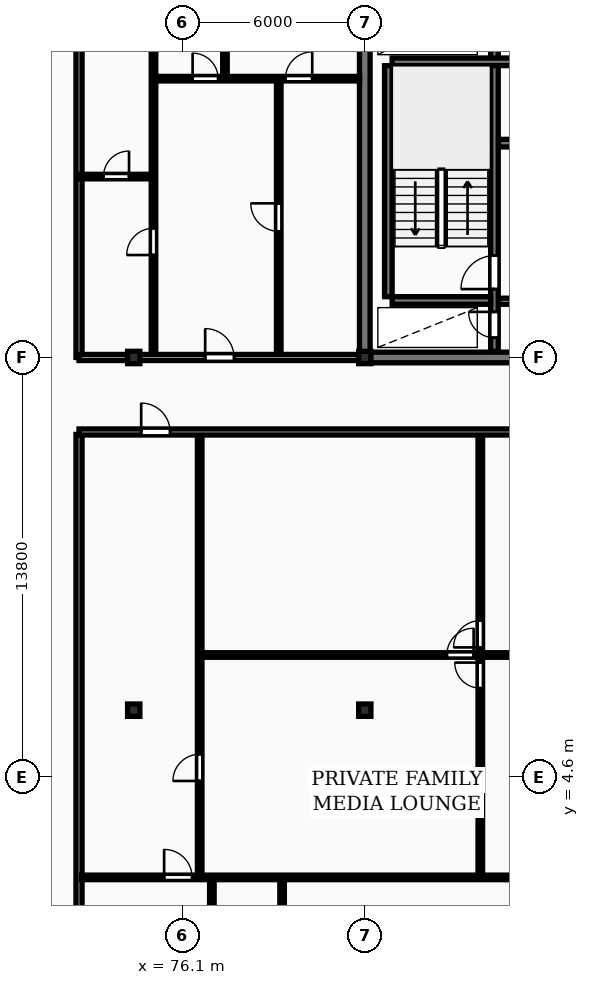
"""IFC4 building model, lengths in metres.
Left out: names, types, materials, properties, quantities, classifications, styles, units other than length and angle.
Written with IfcOpenShell. Run it as: python <this file> out.ifc"""

import sys

from ifc_helpers import new_model, si_unit, direction, frame, frame_2d, origin, origin_2d, place, context, subcontext, project, spatial, rectangle, i_section, extrude, element, fill, save


model = new_model("IFC4")
c1 = context("Model", 3, precision=1e-05, world=origin(), true_north=direction((0.0, 1.0)))
c2 = subcontext(c1, "Body", "Model", "MODEL_VIEW")
j1 = project(units=[si_unit("LENGTHUNIT", "METRE"), si_unit("PLANEANGLEUNIT", "RADIAN")], contexts=[c1])
p1 = place(None, origin())
s1 = spatial("IfcSite", under=j1, at=p1, CompositionType="ELEMENT")
p2 = place(p1, origin())
s2 = spatial("IfcBuilding", under=s1, at=p2, CompositionType="ELEMENT")
p3 = place(p2, frame((0.0, 0.0, 139.3)))
s3 = spatial("IfcBuildingStorey", under=s2, at=p3, CompositionType="ELEMENT", Elevation=139.3)
for number, where, z_axis, x_axis in (
    (1, (74.5, 6.8, 0.0), (0.0, 0.0, 1.0), (1.0, 0.0, 0.0)),
    (2, (74.5, 18.4, 0.0), (0.0, 0.0, 1.0), (1.0, 0.0, 0.0)),
    (3, (82.1, 6.8, 0.0), (0.0, 0.0, 1.0), (1.0, 0.0, 0.0)),
    (4, (82.1, 18.4, 0.0), (0.0, 0.0, 1.0), (1.0, 0.0, 0.0)),
):
    element("IfcColumn", number, at=place(p3, frame(where, z_axis=z_axis, x_axis=x_axis)), inside=s3, PredefinedType="COLUMN", context=c2, shape_type="SweptSolid", body=[
        extrude(i_section(OverallWidth=0.403, OverallDepth=0.406, WebThickness=0.027, FlangeThickness=0.043, FilletRadius=0.015, at=origin_2d()), origin(), (0.0, 0.0, 1.0), 3.6),
    ])
p4 = place(p3, frame((82.1, 18.575, 0.0), z_axis=(0.0, 0.0, 1.0), x_axis=(0.0, 1.0, 0.0)))
e5 = element("IfcWall", 5, at=p4, inside=s3, PredefinedType="SHEAR", context=c2, shape_type="SweptSolid", body=[
    extrude(rectangle(XDim=11.65, YDim=0.35, at=frame_2d((5.825, 0.0))), origin(), (0.0, 0.0, 1.0), 3.6),
])
p5 = place(p3, frame((81.925, 18.4, 0.0), z_axis=(0.0, 0.0, 1.0), x_axis=(1.0, 0.0, 0.0)))
e6 = element("IfcWall", 6, at=p5, inside=s3, PredefinedType="SHEAR", context=c2, shape_type="SweptSolid", body=[
    extrude(rectangle(XDim=36.265, YDim=0.35, at=frame_2d((18.132, 0.0))), origin(), (0.0, 0.0, 1.0), 3.6),
])
p6 = place(p5, frame((5.675, 0.0, 0.0)))
e7 = element("IfcOpeningElement", 7, at=p6, cuts=e6, PredefinedType="OPENING", context=c2, shape_type="SweptSolid", body=[
    extrude(rectangle(XDim=1.0, YDim=2.15, at=frame_2d((0.5, 1.075))), frame((0.0, 0.185, 0.0), z_axis=(0.0, -1.0, 0.0), x_axis=(1.0, 0.0, 0.0)), (0.0, 0.0, 1.0), 0.37),
])
p7 = place(p5, frame((21.925, 0.0, 0.0)))
e8 = element("IfcOpeningElement", 8, at=p7, cuts=e6, PredefinedType="OPENING", context=c2, shape_type="SweptSolid", body=[
    extrude(rectangle(XDim=1.5, YDim=2.2, at=frame_2d((0.75, 1.1))), frame((0.0, 0.185, 0.0), z_axis=(0.0, -1.0, 0.0), x_axis=(1.0, 0.0, 0.0)), (0.0, 0.0, 1.0), 0.37),
])
p8 = place(p5, frame((29.875, 0.0, 0.0)))
e9 = element("IfcOpeningElement", 9, at=p8, cuts=e6, PredefinedType="OPENING", context=c2, shape_type="SweptSolid", body=[
    extrude(rectangle(XDim=1.0, YDim=2.15, at=frame_2d((0.5, 1.075))), frame((0.0, 0.185, 0.0), z_axis=(0.0, -1.0, 0.0), x_axis=(1.0, 0.0, 0.0)), (0.0, 0.0, 1.0), 0.37),
])
p9 = place(p3, frame((82.875, 20.4, 0.0), z_axis=(0.0, 0.0, 1.0), x_axis=(0.0, 1.0, 0.0)))
e10 = element("IfcWall", 10, at=p9, inside=s3, PredefinedType="SHEAR", context=c2, shape_type="SweptSolid", body=[
    extrude(rectangle(XDim=7.6, YDim=0.25, at=frame_2d((3.8, 0.0))), origin(), (0.0, 0.0, 1.0), 3.6),
])
p10 = place(p3, frame((86.365, 18.6, 0.0), z_axis=(0.0, 0.0, 1.0), x_axis=(0.0, 1.0, 0.0)))
e11 = element("IfcWall", 11, at=p10, inside=s3, PredefinedType="SHEAR", context=c2, shape_type="SweptSolid", body=[
    extrude(rectangle(XDim=11.6, YDim=0.25, at=frame_2d((5.8, 0.0))), origin(), (0.0, 0.0, 1.0), 3.6),
])
p11 = place(p10, frame((0.45, 0.0, 0.0)))
e12 = element("IfcOpeningElement", 12, at=p11, cuts=e11, PredefinedType="OPENING", context=c2, shape_type="SweptSolid", body=[
    extrude(rectangle(XDim=0.85, YDim=2.05, at=frame_2d((0.425, 1.025))), frame((0.0, 0.135, 0.0), z_axis=(0.0, -1.0, 0.0), x_axis=(1.0, 0.0, 0.0)), (0.0, 0.0, 1.0), 0.27),
])
p12 = place(p10, frame((2.05, 0.0, 0.0)))
e13 = element("IfcOpeningElement", 13, at=p12, cuts=e11, PredefinedType="OPENING", context=c2, shape_type="SweptSolid", body=[
    extrude(rectangle(XDim=1.1, YDim=2.1, at=frame_2d((0.55, 1.05))), frame((0.0, 0.135, 0.0), z_axis=(0.0, -1.0, 0.0), x_axis=(1.0, 0.0, 0.0)), (0.0, 0.0, 1.0), 0.27),
])
p13 = place(p10, frame((9.95, 0.0, 0.0)))
e14 = element("IfcOpeningElement", 14, at=p13, cuts=e11, PredefinedType="OPENING", context=c2, shape_type="SweptSolid", body=[
    extrude(rectangle(XDim=0.85, YDim=2.05, at=frame_2d((0.425, 1.025))), frame((0.0, 0.135, 0.0), z_axis=(0.0, -1.0, 0.0), x_axis=(1.0, 0.0, 0.0)), (0.0, 0.0, 1.0), 0.27),
])
p14 = place(p3, frame((83.0, 20.275, 0.0), z_axis=(0.0, 0.0, 1.0), x_axis=(1.0, 0.0, 0.0)))
e15 = element("IfcWall", 15, at=p14, inside=s3, PredefinedType="SHEAR", context=c2, shape_type="SweptSolid", body=[
    extrude(rectangle(XDim=3.24, YDim=0.25, at=frame_2d((1.62, 0.0))), origin(), (0.0, 0.0, 1.0), 3.6),
])
p15 = place(p3, frame((83.0, 28.125, 0.0), z_axis=(0.0, 0.0, 1.0), x_axis=(1.0, 0.0, 0.0)))
e16 = element("IfcWall", 16, at=p15, inside=s3, PredefinedType="SHEAR", context=c2, shape_type="SweptSolid", body=[
    extrude(rectangle(XDim=7.82, YDim=0.25, at=frame_2d((3.91, 0.0))), origin(), (0.0, 0.0, 1.0), 3.6),
])
p16 = place(p3, frame((86.5, 25.45, 0.0), z_axis=(0.0, 0.0, 1.0), x_axis=(1.0, 0.0, 0.0)))
e17 = element("IfcWall", 17, at=p16, inside=s3, PredefinedType="SHEAR", context=c2, shape_type="SweptSolid", body=[
    extrude(rectangle(XDim=4.32, YDim=0.25, at=frame_2d((2.16, 0.0))), origin(), (0.0, 0.0, 1.0), 3.6),
])
p17 = place(p16, frame((1.14, 0.0, 0.0)))
e18 = element("IfcOpeningElement", 18, at=p17, cuts=e17, PredefinedType="OPENING", context=c2, shape_type="SweptSolid", body=[
    extrude(rectangle(XDim=1.12, YDim=2.12, at=frame_2d((0.56, 1.06))), frame((0.0, 0.135, 0.0), z_axis=(0.0, -1.0, 0.0), x_axis=(1.0, 0.0, 0.0)), (0.0, 0.0, 1.0), 0.27),
])
p18 = place(p16, frame((3.25, 0.0, 0.0)))
e19 = element("IfcOpeningElement", 19, at=p18, cuts=e17, PredefinedType="OPENING", context=c2, shape_type="SweptSolid", body=[
    extrude(rectangle(XDim=0.85, YDim=2.05, at=frame_2d((0.425, 1.025))), frame((0.0, 0.135, 0.0), z_axis=(0.0, -1.0, 0.0), x_axis=(1.0, 0.0, 0.0)), (0.0, 0.0, 1.0), 0.27),
])
p19 = place(p3, frame((86.5, 20.25, 0.0), z_axis=(0.0, 0.0, 1.0), x_axis=(1.0, 0.0, 0.0)))
e20 = element("IfcWall", 20, at=p19, inside=s3, PredefinedType="PARTITIONING", context=c2, shape_type="SweptSolid", body=[
    extrude(rectangle(XDim=4.32, YDim=0.2, at=frame_2d((2.16, 0.0))), origin(), (0.0, 0.0, 1.0), 3.31),
])
p20 = place(p19, frame((1.4, 0.0, 0.0)))
e21 = element("IfcOpeningElement", 21, at=p20, cuts=e20, PredefinedType="OPENING", context=c2, shape_type="SweptSolid", body=[
    extrude(rectangle(XDim=1.1, YDim=2.1, at=frame_2d((0.55, 1.05))), frame((0.0, 0.11, 0.0), z_axis=(0.0, -1.0, 0.0), x_axis=(1.0, 0.0, 0.0)), (0.0, 0.0, 1.0), 0.22),
])
p21 = place(p3, frame((72.7, 18.4, 0.0), z_axis=(0.0, 0.0, 1.0), x_axis=(0.0, 1.0, 0.0)))
e22 = element("IfcWall", 22, at=p21, inside=s3, PredefinedType="PARTITIONING", context=c2, shape_type="SweptSolid", body=[
    extrude(rectangle(XDim=14.1, YDim=0.2, at=frame_2d((7.05, 0.0))), origin(), (0.0, 0.0, 1.0), 3.31),
])
p22 = place(p3, frame((72.7, 24.35, 0.0), z_axis=(0.0, 0.0, 1.0), x_axis=(1.0, 0.0, 0.0)))
e23 = element("IfcWall", 23, at=p22, inside=s3, PredefinedType="PARTITIONING", context=c2, shape_type="SweptSolid", body=[
    extrude(rectangle(XDim=2.45, YDim=0.15, at=frame_2d((1.225, 0.0))), origin(), (0.0, 0.0, 1.0), 3.31),
])
p23 = place(p22, frame((0.805, 0.0, 0.0)))
e24 = element("IfcOpeningElement", 24, at=p23, cuts=e23, PredefinedType="OPENING", context=c2, shape_type="SweptSolid", body=[
    extrude(rectangle(XDim=0.84, YDim=2.04, at=frame_2d((0.42, 1.02))), frame((0.0, 0.085, 0.0), z_axis=(0.0, -1.0, 0.0), x_axis=(1.0, 0.0, 0.0)), (0.0, 0.0, 1.0), 0.17),
])
p24 = place(p3, frame((75.15, 18.45, 0.0), z_axis=(0.0, 0.0, 1.0), x_axis=(0.0, 1.0, 0.0)))
e25 = element("IfcWall", 25, at=p24, inside=s3, PredefinedType="PARTITIONING", context=c2, shape_type="SweptSolid", body=[
    extrude(rectangle(XDim=14.05, YDim=0.15, at=frame_2d((7.025, 0.0))), origin(), (0.0, 0.0, 1.0), 3.31),
])
p25 = place(p24, frame((3.32, 0.0, 0.0)))
e26 = element("IfcOpeningElement", 26, at=p25, cuts=e25, PredefinedType="OPENING", context=c2, shape_type="SweptSolid", body=[
    extrude(rectangle(XDim=0.88, YDim=2.06, at=frame_2d((0.44, 1.03))), frame((0.0, 0.085, 0.0), z_axis=(0.0, -1.0, 0.0), x_axis=(1.0, 0.0, 0.0)), (0.0, 0.0, 1.0), 0.17),
])
p26 = place(p3, frame((79.27, 18.45, 0.0), z_axis=(0.0, 0.0, 1.0), x_axis=(0.0, 1.0, 0.0)))
e27 = element("IfcWall", 27, at=p26, inside=s3, PredefinedType="PARTITIONING", context=c2, shape_type="SweptSolid", body=[
    extrude(rectangle(XDim=9.12, YDim=0.15, at=frame_2d((4.56, 0.0))), origin(), (0.0, 0.0, 1.0), 3.31),
])
p27 = place(p26, frame((4.1, 0.0, 0.0)))
e28 = element("IfcOpeningElement", 28, at=p27, cuts=e27, PredefinedType="OPENING", context=c2, shape_type="SweptSolid", body=[
    extrude(rectangle(XDim=0.92, YDim=2.08, at=frame_2d((0.46, 1.04))), frame((0.0, 0.085, 0.0), z_axis=(0.0, -1.0, 0.0), x_axis=(1.0, 0.0, 0.0)), (0.0, 0.0, 1.0), 0.17),
])
p28 = place(p3, frame((77.5, 27.57, 0.0), z_axis=(0.0, 0.0, 1.0), x_axis=(0.0, 1.0, 0.0)))
e29 = element("IfcWall", 29, at=p28, inside=s3, PredefinedType="PARTITIONING", context=c2, shape_type="SweptSolid", body=[
    extrude(rectangle(XDim=4.93, YDim=0.15, at=frame_2d((2.465, 0.0))), origin(), (0.0, 0.0, 1.0), 3.31),
])
p29 = place(p3, frame((75.17, 27.57, 0.0), z_axis=(0.0, 0.0, 1.0), x_axis=(1.0, 0.0, 0.0)))
e30 = element("IfcWall", 30, at=p29, inside=s3, PredefinedType="PARTITIONING", context=c2, shape_type="SweptSolid", body=[
    extrude(rectangle(XDim=6.76, YDim=0.15, at=frame_2d((3.38, 0.0))), origin(), (0.0, 0.0, 1.0), 3.31),
])
p30 = place(p29, frame((1.266, 0.0, 0.0)))
e31 = element("IfcOpeningElement", 31, at=p30, cuts=e30, PredefinedType="OPENING", context=c2, shape_type="SweptSolid", body=[
    extrude(rectangle(XDim=0.84, YDim=2.04, at=frame_2d((0.42, 1.02))), frame((0.0, 0.085, 0.0), z_axis=(0.0, -1.0, 0.0), x_axis=(1.0, 0.0, 0.0)), (0.0, 0.0, 1.0), 0.17),
])
p31 = place(p29, frame((4.32, 0.0, 0.0)))
e32 = element("IfcOpeningElement", 32, at=p31, cuts=e30, PredefinedType="OPENING", context=c2, shape_type="SweptSolid", body=[
    extrude(rectangle(XDim=0.88, YDim=2.06, at=frame_2d((0.44, 1.03))), frame((0.0, 0.085, 0.0), z_axis=(0.0, -1.0, 0.0), x_axis=(1.0, 0.0, 0.0)), (0.0, 0.0, 1.0), 0.17),
])
p32 = place(p3, frame((72.7, 18.4, 0.0), z_axis=(0.0, 0.0, 1.0), x_axis=(1.0, 0.0, 0.0)))
e33 = element("IfcWall", 33, at=p32, inside=s3, PredefinedType="PARTITIONING", context=c2, shape_type="SweptSolid", body=[
    extrude(rectangle(XDim=9.25, YDim=0.2, at=frame_2d((4.625, 0.0))), origin(), (0.0, 0.0, 1.0), 2.698),
])
p33 = place(p32, frame((4.15, 0.0, 0.0)))
e34 = element("IfcOpeningElement", 34, at=p33, cuts=e33, PredefinedType="OPENING", context=c2, shape_type="SweptSolid", body=[
    extrude(rectangle(XDim=0.95, YDim=2.15, at=frame_2d((0.475, 1.075))), frame((0.0, 0.11, 0.0), z_axis=(0.0, -1.0, 0.0), x_axis=(1.0, 0.0, 0.0)), (0.0, 0.0, 1.0), 0.22),
])
p34 = place(p3, frame((72.7, -8.7, 0.0), z_axis=(0.0, 0.0, 1.0), x_axis=(0.0, 1.0, 0.0)))
e35 = element("IfcWall", 35, at=p34, inside=s3, PredefinedType="PARTITIONING", context=c2, shape_type="SweptSolid", body=[
    extrude(rectangle(XDim=24.57, YDim=0.2, at=frame_2d((12.285, 0.0))), origin(), (0.0, 0.0, 1.0), 3.31),
])
p35 = place(p3, frame((85.9, 1.34, 0.0), z_axis=(0.0, 0.0, 1.0), x_axis=(0.0, 1.0, 0.0)))
e36 = element("IfcWall", 36, at=p35, inside=s3, PredefinedType="PARTITIONING", context=c2, shape_type="SweptSolid", body=[
    extrude(rectangle(XDim=14.55, YDim=0.15, at=frame_2d((7.275, 0.0))), origin(), (0.0, 0.0, 1.0), 3.31),
])
p36 = place(p35, frame((6.185, 0.0, 0.0)))
e37 = element("IfcOpeningElement", 37, at=p36, cuts=e36, PredefinedType="OPENING", context=c2, shape_type="SweptSolid", body=[
    extrude(rectangle(XDim=0.84, YDim=2.04, at=frame_2d((0.42, 1.02))), frame((0.0, 0.085, 0.0), z_axis=(0.0, -1.0, 0.0), x_axis=(1.0, 0.0, 0.0)), (0.0, 0.0, 1.0), 0.17),
])
p37 = place(p35, frame((7.525, 0.0, 0.0)))
e38 = element("IfcOpeningElement", 38, at=p37, cuts=e36, PredefinedType="OPENING", context=c2, shape_type="SweptSolid", body=[
    extrude(rectangle(XDim=0.88, YDim=2.06, at=frame_2d((0.44, 1.03))), frame((0.0, 0.085, 0.0), z_axis=(0.0, -1.0, 0.0), x_axis=(1.0, 0.0, 0.0)), (0.0, 0.0, 1.0), 0.17),
])
p38 = place(p3, frame((76.73, 8.615, 0.0), z_axis=(0.0, 0.0, 1.0), x_axis=(1.0, 0.0, 0.0)))
e39 = element("IfcWall", 39, at=p38, inside=s3, PredefinedType="PARTITIONING", context=c2, shape_type="SweptSolid", body=[
    extrude(rectangle(XDim=18.14, YDim=0.15, at=frame_2d((9.07, 0.0))), origin(), (0.0, 0.0, 1.0), 3.31),
])
p39 = place(p38, frame((8.07, 0.0, 0.0)))
e40 = element("IfcOpeningElement", 40, at=p39, cuts=e39, PredefinedType="OPENING", context=c2, shape_type="SweptSolid", body=[
    extrude(rectangle(XDim=0.88, YDim=2.06, at=frame_2d((0.44, 1.03))), frame((0.0, 0.085, 0.0), z_axis=(0.0, -1.0, 0.0), x_axis=(1.0, 0.0, 0.0)), (0.0, 0.0, 1.0), 0.17),
])
p40 = place(p3, frame((76.67, 1.34, 0.0), z_axis=(0.0, 0.0, 1.0), x_axis=(0.0, 1.0, 0.0)))
e41 = element("IfcWall", 41, at=p40, inside=s3, PredefinedType="PARTITIONING", context=c2, shape_type="SweptSolid", body=[
    extrude(rectangle(XDim=14.55, YDim=0.15, at=frame_2d((7.275, 0.0))), origin(), (0.0, 0.0, 1.0), 3.31),
])
p41 = place(p40, frame((3.132, 0.0, 0.0)))
e42 = element("IfcOpeningElement", 42, at=p41, cuts=e41, PredefinedType="OPENING", context=c2, shape_type="SweptSolid", body=[
    extrude(rectangle(XDim=0.88, YDim=2.06, at=frame_2d((0.44, 1.03))), frame((0.0, 0.085, 0.0), z_axis=(0.0, -1.0, 0.0), x_axis=(1.0, 0.0, 0.0)), (0.0, 0.0, 1.0), 0.17),
])
p42 = place(p3, frame((79.38, -1.32, 0.0), z_axis=(0.0, 0.0, 1.0), x_axis=(0.0, 1.0, 0.0)))
e43 = element("IfcWall", 43, at=p42, inside=s3, PredefinedType="PARTITIONING", context=c2, shape_type="SweptSolid", body=[
    extrude(rectangle(XDim=2.58, YDim=0.15, at=frame_2d((1.29, 0.0))), origin(), (0.0, 0.0, 1.0), 3.31),
])
p43 = place(p3, frame((77.07, -8.7, 0.0), z_axis=(0.0, 0.0, 1.0), x_axis=(0.0, 1.0, 0.0)))
e44 = element("IfcWall", 44, at=p43, inside=s3, PredefinedType="PARTITIONING", context=c2, shape_type="SweptSolid", body=[
    extrude(rectangle(XDim=9.96, YDim=0.15, at=frame_2d((4.98, 0.0))), origin(), (0.0, 0.0, 1.0), 3.31),
])
p44 = place(p43, frame((5.22, 0.0, 0.0)))
e45 = element("IfcOpeningElement", 45, at=p44, cuts=e44, PredefinedType="OPENING", context=c2, shape_type="SweptSolid", body=[
    extrude(rectangle(XDim=0.92, YDim=2.08, at=frame_2d((0.46, 1.04))), frame((0.0, 0.085, 0.0), z_axis=(0.0, -1.0, 0.0), x_axis=(1.0, 0.0, 0.0)), (0.0, 0.0, 1.0), 0.17),
])
p45 = place(p3, frame((72.78, 1.3, 0.0), z_axis=(0.0, 0.0, 1.0), x_axis=(1.0, 0.0, 0.0)))
e46 = element("IfcWall", 46, at=p45, inside=s3, PredefinedType="PARTITIONING", context=c2, shape_type="SweptSolid", body=[
    extrude(rectangle(XDim=22.09, YDim=0.15, at=frame_2d((11.045, 0.0))), origin(), (0.0, 0.0, 1.0), 3.31),
])
p46 = place(p45, frame((2.72, 0.0, 0.0)))
e47 = element("IfcOpeningElement", 47, at=p46, cuts=e46, PredefinedType="OPENING", context=c2, shape_type="SweptSolid", body=[
    extrude(rectangle(XDim=0.92, YDim=2.08, at=frame_2d((0.46, 1.04))), frame((0.0, 0.085, 0.0), z_axis=(0.0, -1.0, 0.0), x_axis=(1.0, 0.0, 0.0)), (0.0, 0.0, 1.0), 0.17),
])
p47 = place(p3, frame((72.7, 15.95, 0.0), z_axis=(0.0, 0.0, 1.0), x_axis=(1.0, 0.0, 0.0)))
e48 = element("IfcWall", 48, at=p47, inside=s3, PredefinedType="PARTITIONING", context=c2, shape_type="SweptSolid", body=[
    extrude(rectangle(XDim=58.0, YDim=0.2, at=frame_2d((29.0, 0.0))), origin(), (0.0, 0.0, 1.0), 3.31),
])
p48 = place(p47, frame((2.045, 0.0, 0.0)))
e49 = element("IfcOpeningElement", 49, at=p48, cuts=e48, PredefinedType="OPENING", context=c2, shape_type="SweptSolid", body=[
    extrude(rectangle(XDim=0.95, YDim=2.15, at=frame_2d((0.475, 1.075))), frame((0.0, 0.11, 0.0), z_axis=(0.0, -1.0, 0.0), x_axis=(1.0, 0.0, 0.0)), (0.0, 0.0, 1.0), 0.22),
])
p49 = place(p47, frame((24.295, 0.0, 0.0)))
e50 = element("IfcOpeningElement", 50, at=p49, cuts=e48, PredefinedType="OPENING", context=c2, shape_type="SweptSolid", body=[
    extrude(rectangle(XDim=0.95, YDim=2.15, at=frame_2d((0.475, 1.075))), frame((0.0, 0.11, 0.0), z_axis=(0.0, -1.0, 0.0), x_axis=(1.0, 0.0, 0.0)), (0.0, 0.0, 1.0), 0.22),
])
p50 = place(p47, frame((39.753, 0.0, 0.0)))
e51 = element("IfcOpeningElement", 51, at=p50, cuts=e48, PredefinedType="OPENING", context=c2, shape_type="SweptSolid", body=[
    extrude(rectangle(XDim=0.95, YDim=2.15, at=frame_2d((0.475, 1.075))), frame((0.0, 0.11, 0.0), z_axis=(0.0, -1.0, 0.0), x_axis=(1.0, 0.0, 0.0)), (0.0, 0.0, 1.0), 0.22),
])
p51 = place(p11, origin())
e52 = element("IfcDoor", 52, at=p51, inside=s3, OperationType="SINGLE_SWING_RIGHT", PredefinedType="DOOR", context=c2, shape_type="SweptSolid", body=[
    extrude(rectangle(XDim=0.85, YDim=2.05, at=frame_2d((0.425, 1.025))), frame((0.0, 0.025, 0.0), z_axis=(0.0, -1.0, 0.0), x_axis=(1.0, 0.0, 0.0)), (0.0, 0.0, 1.0), 0.05),
])
fill(e12, e52)
p52 = place(p12, origin())
e53 = element("IfcDoor", 53, at=p52, inside=s3, OperationType="SINGLE_SWING_LEFT", PredefinedType="DOOR", context=c2, shape_type="SweptSolid", body=[
    extrude(rectangle(XDim=1.1, YDim=2.1, at=frame_2d((0.55, 1.05))), frame((0.0, 0.025, 0.0), z_axis=(0.0, -1.0, 0.0), x_axis=(1.0, 0.0, 0.0)), (0.0, 0.0, 1.0), 0.05),
])
fill(e13, e53)
p53 = place(p23, origin())
e54 = element("IfcDoor", 54, at=p53, inside=s3, OperationType="SINGLE_SWING_RIGHT", PredefinedType="DOOR", context=c2, shape_type="SweptSolid", body=[
    extrude(rectangle(XDim=0.84, YDim=2.04, at=frame_2d((0.42, 1.02))), frame((0.0, 0.025, 0.0), z_axis=(0.0, -1.0, 0.0), x_axis=(1.0, 0.0, 0.0)), (0.0, 0.0, 1.0), 0.05),
])
fill(e24, e54)
p54 = place(p25, origin())
e55 = element("IfcDoor", 55, at=p54, inside=s3, OperationType="SINGLE_SWING_LEFT", PredefinedType="DOOR", context=c2, shape_type="SweptSolid", body=[
    extrude(rectangle(XDim=0.88, YDim=2.06, at=frame_2d((0.44, 1.03))), frame((0.0, 0.025, 0.0), z_axis=(0.0, -1.0, 0.0), x_axis=(1.0, 0.0, 0.0)), (0.0, 0.0, 1.0), 0.05),
])
fill(e26, e55)
p55 = place(p27, origin())
e56 = element("IfcDoor", 56, at=p55, inside=s3, OperationType="SINGLE_SWING_RIGHT", PredefinedType="DOOR", context=c2, shape_type="SweptSolid", body=[
    extrude(rectangle(XDim=0.92, YDim=2.08, at=frame_2d((0.46, 1.04))), frame((0.0, 0.025, 0.0), z_axis=(0.0, -1.0, 0.0), x_axis=(1.0, 0.0, 0.0)), (0.0, 0.0, 1.0), 0.05),
])
fill(e28, e56)
p56 = place(p30, origin())
e57 = element("IfcDoor", 57, at=p56, inside=s3, OperationType="SINGLE_SWING_LEFT", PredefinedType="DOOR", context=c2, shape_type="SweptSolid", body=[
    extrude(rectangle(XDim=0.84, YDim=2.04, at=frame_2d((0.42, 1.02))), frame((0.0, 0.025, 0.0), z_axis=(0.0, -1.0, 0.0), x_axis=(1.0, 0.0, 0.0)), (0.0, 0.0, 1.0), 0.05),
])
fill(e31, e57)
p57 = place(p31, origin())
e58 = element("IfcDoor", 58, at=p57, inside=s3, OperationType="SINGLE_SWING_RIGHT", PredefinedType="DOOR", context=c2, shape_type="SweptSolid", body=[
    extrude(rectangle(XDim=0.88, YDim=2.06, at=frame_2d((0.44, 1.03))), frame((0.0, 0.025, 0.0), z_axis=(0.0, -1.0, 0.0), x_axis=(1.0, 0.0, 0.0)), (0.0, 0.0, 1.0), 0.05),
])
fill(e32, e58)
p58 = place(p33, origin())
e59 = element("IfcDoor", 59, at=p58, inside=s3, OperationType="SINGLE_SWING_LEFT", PredefinedType="DOOR", context=c2, shape_type="SweptSolid", body=[
    extrude(rectangle(XDim=0.95, YDim=2.15, at=frame_2d((0.475, 1.075))), frame((0.0, 0.025, 0.0), z_axis=(0.0, -1.0, 0.0), x_axis=(1.0, 0.0, 0.0)), (0.0, 0.0, 1.0), 0.05),
])
fill(e34, e59)
p59 = place(p36, origin())
e60 = element("IfcDoor", 60, at=p59, inside=s3, OperationType="SINGLE_SWING_RIGHT", PredefinedType="DOOR", context=c2, shape_type="SweptSolid", body=[
    extrude(rectangle(XDim=0.84, YDim=2.04, at=frame_2d((0.42, 1.02))), frame((0.0, 0.025, 0.0), z_axis=(0.0, -1.0, 0.0), x_axis=(1.0, 0.0, 0.0)), (0.0, 0.0, 1.0), 0.05),
])
fill(e37, e60)
p60 = place(p37, origin())
e61 = element("IfcDoor", 61, at=p60, inside=s3, OperationType="SINGLE_SWING_LEFT", PredefinedType="DOOR", context=c2, shape_type="SweptSolid", body=[
    extrude(rectangle(XDim=0.88, YDim=2.06, at=frame_2d((0.44, 1.03))), frame((0.0, 0.025, 0.0), z_axis=(0.0, -1.0, 0.0), x_axis=(1.0, 0.0, 0.0)), (0.0, 0.0, 1.0), 0.05),
])
fill(e38, e61)
p61 = place(p39, origin())
e62 = element("IfcDoor", 62, at=p61, inside=s3, OperationType="SINGLE_SWING_RIGHT", PredefinedType="DOOR", context=c2, shape_type="SweptSolid", body=[
    extrude(rectangle(XDim=0.88, YDim=2.06, at=frame_2d((0.44, 1.03))), frame((0.0, 0.025, 0.0), z_axis=(0.0, -1.0, 0.0), x_axis=(1.0, 0.0, 0.0)), (0.0, 0.0, 1.0), 0.05),
])
fill(e40, e62)
p62 = place(p41, origin())
e63 = element("IfcDoor", 63, at=p62, inside=s3, OperationType="SINGLE_SWING_LEFT", PredefinedType="DOOR", context=c2, shape_type="SweptSolid", body=[
    extrude(rectangle(XDim=0.88, YDim=2.06, at=frame_2d((0.44, 1.03))), frame((0.0, 0.025, 0.0), z_axis=(0.0, -1.0, 0.0), x_axis=(1.0, 0.0, 0.0)), (0.0, 0.0, 1.0), 0.05),
])
fill(e42, e63)
p63 = place(p46, origin())
e64 = element("IfcDoor", 64, at=p63, inside=s3, OperationType="SINGLE_SWING_LEFT", PredefinedType="DOOR", context=c2, shape_type="SweptSolid", body=[
    extrude(rectangle(XDim=0.92, YDim=2.08, at=frame_2d((0.46, 1.04))), frame((0.0, 0.025, 0.0), z_axis=(0.0, -1.0, 0.0), x_axis=(1.0, 0.0, 0.0)), (0.0, 0.0, 1.0), 0.05),
])
fill(e47, e64)
p64 = place(p48, origin())
e65 = element("IfcDoor", 65, at=p64, inside=s3, OperationType="SINGLE_SWING_LEFT", PredefinedType="DOOR", context=c2, shape_type="SweptSolid", body=[
    extrude(rectangle(XDim=0.95, YDim=2.15, at=frame_2d((0.475, 1.075))), frame((0.0, 0.025, 0.0), z_axis=(0.0, -1.0, 0.0), x_axis=(1.0, 0.0, 0.0)), (0.0, 0.0, 1.0), 0.05),
])
fill(e49, e65)
save(model, sys.argv[1])
